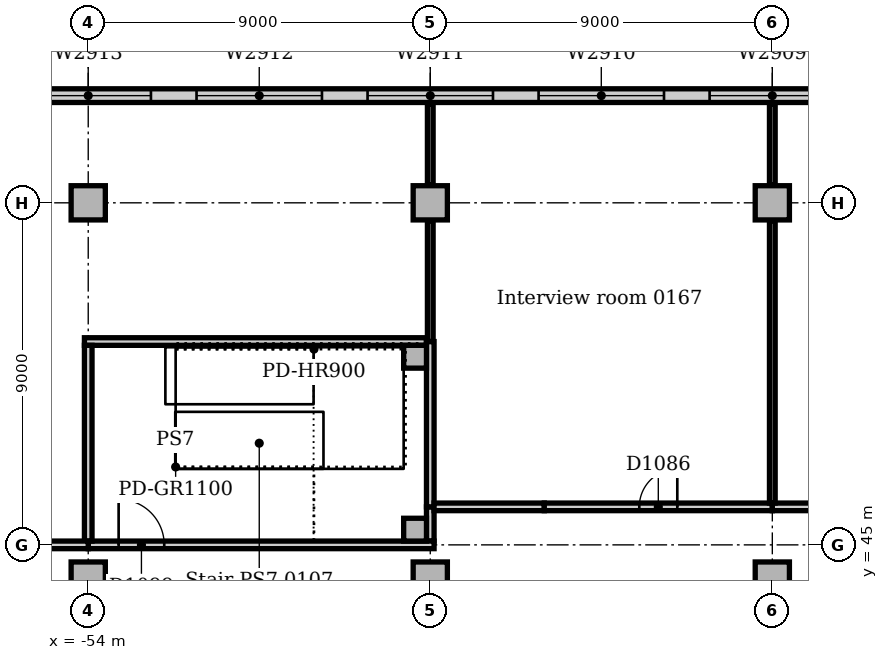
"""IFC4 building model, lengths in metres.
Left out: names, types, materials, properties, quantities, classifications, styles, units other than length and angle.
Written with IfcOpenShell. Run it as: python <this file> out.ifc"""

import sys

from ifc_helpers import new_model, si_unit, direction, frame, frame_2d, origin, origin_2d, place, context, subcontext, project, spatial, rectangle, extrude, element, fill, save


model = new_model("IFC4")
c1 = context("Model", 3, precision=1e-05, world=origin(), true_north=direction((0.0, 1.0)))
c2 = subcontext(c1, "Body", "Model", "MODEL_VIEW")
j1 = project(units=[si_unit("LENGTHUNIT", "METRE"), si_unit("PLANEANGLEUNIT", "RADIAN")], contexts=[c1])
p1 = place(None, origin())
s1 = spatial("IfcSite", under=j1, at=p1, CompositionType="ELEMENT")
p2 = place(p1, origin())
s2 = spatial("IfcBuilding", under=s1, at=p2, CompositionType="ELEMENT")
p3 = place(p2, frame((0.0, 0.0, 6.0)))
s3 = spatial("IfcBuildingStorey", under=s2, at=p3, CompositionType="ELEMENT", Elevation=6.0)
for number, where, z_axis, x_axis in (
    (1, (-54.0, 44.1, 0.0), (0.0, 0.0, 1.0), (1.0, 0.0, 0.0)),
    (2, (-45.0, 44.1, 0.0), (0.0, 0.0, 1.0), (1.0, 0.0, 0.0)),
    (3, (-36.0, 44.1, 0.0), (0.0, 0.0, 1.0), (1.0, 0.0, 0.0)),
    (4, (-54.0, 54.0, 0.0), (0.0, 0.0, 1.0), (1.0, 0.0, 0.0)),
    (5, (-45.0, 54.0, 0.0), (0.0, 0.0, 1.0), (1.0, 0.0, 0.0)),
    (6, (-36.0, 54.0, 0.0), (0.0, 0.0, 1.0), (1.0, 0.0, 0.0)),
):
    element("IfcColumn", number, at=place(p3, frame(where, z_axis=z_axis, x_axis=x_axis)), inside=s3, PredefinedType="COLUMN", context=c2, shape_type="SweptSolid", body=[
        extrude(rectangle(XDim=0.9, YDim=0.9, at=origin_2d()), origin(), (0.0, 0.0, 1.0), 4.7),
    ])
p4 = place(p3, frame((63.0, 56.82, 0.0), z_axis=(0.0, 0.0, 1.0), x_axis=(-1.0, 0.0, 0.0)))
e7 = element("IfcWall", 7, at=p4, inside=s3, PredefinedType="STANDARD", context=c2, shape_type="SweptSolid", body=[
    extrude(rectangle(XDim=144.0, YDim=0.36, at=frame_2d((72.0, 0.0))), origin(), (0.0, 0.0, 1.0), 4.7),
])
p5 = place(p4, frame((2.85, 0.0, 0.9)))
e8 = element("IfcOpeningElement", 8, at=p5, cuts=e7, PredefinedType="OPENING", context=c2, shape_type="SweptSolid", body=[
    extrude(rectangle(XDim=3.3, YDim=2.4, at=frame_2d((1.65, 1.2))), frame((0.0, 0.19, 0.0), z_axis=(0.0, -1.0, 0.0), x_axis=(1.0, 0.0, 0.0)), (0.0, 0.0, 1.0), 0.38),
])
p6 = place(p4, frame((7.35, 0.0, 0.9)))
e9 = element("IfcOpeningElement", 9, at=p6, cuts=e7, PredefinedType="OPENING", context=c2, shape_type="SweptSolid", body=[
    extrude(rectangle(XDim=3.3, YDim=2.4, at=frame_2d((1.65, 1.2))), frame((0.0, 0.19, 0.0), z_axis=(0.0, -1.0, 0.0), x_axis=(1.0, 0.0, 0.0)), (0.0, 0.0, 1.0), 0.38),
])
p7 = place(p4, frame((11.85, 0.0, 0.9)))
e10 = element("IfcOpeningElement", 10, at=p7, cuts=e7, PredefinedType="OPENING", context=c2, shape_type="SweptSolid", body=[
    extrude(rectangle(XDim=3.3, YDim=2.4, at=frame_2d((1.65, 1.2))), frame((0.0, 0.19, 0.0), z_axis=(0.0, -1.0, 0.0), x_axis=(1.0, 0.0, 0.0)), (0.0, 0.0, 1.0), 0.38),
])
p8 = place(p4, frame((16.35, 0.0, 0.9)))
e11 = element("IfcOpeningElement", 11, at=p8, cuts=e7, PredefinedType="OPENING", context=c2, shape_type="SweptSolid", body=[
    extrude(rectangle(XDim=3.3, YDim=2.4, at=frame_2d((1.65, 1.2))), frame((0.0, 0.19, 0.0), z_axis=(0.0, -1.0, 0.0), x_axis=(1.0, 0.0, 0.0)), (0.0, 0.0, 1.0), 0.38),
])
p9 = place(p4, frame((20.85, 0.0, 0.9)))
e12 = element("IfcOpeningElement", 12, at=p9, cuts=e7, PredefinedType="OPENING", context=c2, shape_type="SweptSolid", body=[
    extrude(rectangle(XDim=3.3, YDim=2.4, at=frame_2d((1.65, 1.2))), frame((0.0, 0.19, 0.0), z_axis=(0.0, -1.0, 0.0), x_axis=(1.0, 0.0, 0.0)), (0.0, 0.0, 1.0), 0.38),
])
p10 = place(p4, frame((25.35, 0.0, 0.9)))
e13 = element("IfcOpeningElement", 13, at=p10, cuts=e7, PredefinedType="OPENING", context=c2, shape_type="SweptSolid", body=[
    extrude(rectangle(XDim=3.3, YDim=2.4, at=frame_2d((1.65, 1.2))), frame((0.0, 0.19, 0.0), z_axis=(0.0, -1.0, 0.0), x_axis=(1.0, 0.0, 0.0)), (0.0, 0.0, 1.0), 0.38),
])
p11 = place(p4, frame((29.85, 0.0, 0.9)))
e14 = element("IfcOpeningElement", 14, at=p11, cuts=e7, PredefinedType="OPENING", context=c2, shape_type="SweptSolid", body=[
    extrude(rectangle(XDim=3.3, YDim=2.4, at=frame_2d((1.65, 1.2))), frame((0.0, 0.19, 0.0), z_axis=(0.0, -1.0, 0.0), x_axis=(1.0, 0.0, 0.0)), (0.0, 0.0, 1.0), 0.38),
])
p12 = place(p4, frame((34.35, 0.0, 0.9)))
e15 = element("IfcOpeningElement", 15, at=p12, cuts=e7, PredefinedType="OPENING", context=c2, shape_type="SweptSolid", body=[
    extrude(rectangle(XDim=3.3, YDim=2.4, at=frame_2d((1.65, 1.2))), frame((0.0, 0.19, 0.0), z_axis=(0.0, -1.0, 0.0), x_axis=(1.0, 0.0, 0.0)), (0.0, 0.0, 1.0), 0.38),
])
p13 = place(p4, frame((38.85, 0.0, 0.9)))
e16 = element("IfcOpeningElement", 16, at=p13, cuts=e7, PredefinedType="OPENING", context=c2, shape_type="SweptSolid", body=[
    extrude(rectangle(XDim=3.3, YDim=2.4, at=frame_2d((1.65, 1.2))), frame((0.0, 0.19, 0.0), z_axis=(0.0, -1.0, 0.0), x_axis=(1.0, 0.0, 0.0)), (0.0, 0.0, 1.0), 0.38),
])
p14 = place(p4, frame((43.35, 0.0, 0.9)))
e17 = element("IfcOpeningElement", 17, at=p14, cuts=e7, PredefinedType="OPENING", context=c2, shape_type="SweptSolid", body=[
    extrude(rectangle(XDim=3.3, YDim=2.4, at=frame_2d((1.65, 1.2))), frame((0.0, 0.19, 0.0), z_axis=(0.0, -1.0, 0.0), x_axis=(1.0, 0.0, 0.0)), (0.0, 0.0, 1.0), 0.38),
])
p15 = place(p4, frame((47.85, 0.0, 0.9)))
e18 = element("IfcOpeningElement", 18, at=p15, cuts=e7, PredefinedType="OPENING", context=c2, shape_type="SweptSolid", body=[
    extrude(rectangle(XDim=3.3, YDim=2.4, at=frame_2d((1.65, 1.2))), frame((0.0, 0.19, 0.0), z_axis=(0.0, -1.0, 0.0), x_axis=(1.0, 0.0, 0.0)), (0.0, 0.0, 1.0), 0.38),
])
p16 = place(p4, frame((52.35, 0.0, 0.9)))
e19 = element("IfcOpeningElement", 19, at=p16, cuts=e7, PredefinedType="OPENING", context=c2, shape_type="SweptSolid", body=[
    extrude(rectangle(XDim=3.3, YDim=2.4, at=frame_2d((1.65, 1.2))), frame((0.0, 0.19, 0.0), z_axis=(0.0, -1.0, 0.0), x_axis=(1.0, 0.0, 0.0)), (0.0, 0.0, 1.0), 0.38),
])
p17 = place(p4, frame((56.85, 0.0, 0.9)))
e20 = element("IfcOpeningElement", 20, at=p17, cuts=e7, PredefinedType="OPENING", context=c2, shape_type="SweptSolid", body=[
    extrude(rectangle(XDim=3.3, YDim=2.4, at=frame_2d((1.65, 1.2))), frame((0.0, 0.19, 0.0), z_axis=(0.0, -1.0, 0.0), x_axis=(1.0, 0.0, 0.0)), (0.0, 0.0, 1.0), 0.38),
])
p18 = place(p4, frame((61.35, 0.0, 0.9)))
e21 = element("IfcOpeningElement", 21, at=p18, cuts=e7, PredefinedType="OPENING", context=c2, shape_type="SweptSolid", body=[
    extrude(rectangle(XDim=3.3, YDim=2.4, at=frame_2d((1.65, 1.2))), frame((0.0, 0.19, 0.0), z_axis=(0.0, -1.0, 0.0), x_axis=(1.0, 0.0, 0.0)), (0.0, 0.0, 1.0), 0.38),
])
p19 = place(p4, frame((65.85, 0.0, 0.9)))
e22 = element("IfcOpeningElement", 22, at=p19, cuts=e7, PredefinedType="OPENING", context=c2, shape_type="SweptSolid", body=[
    extrude(rectangle(XDim=3.3, YDim=2.4, at=frame_2d((1.65, 1.2))), frame((0.0, 0.19, 0.0), z_axis=(0.0, -1.0, 0.0), x_axis=(1.0, 0.0, 0.0)), (0.0, 0.0, 1.0), 0.38),
])
p20 = place(p4, frame((70.35, 0.0, 0.9)))
e23 = element("IfcOpeningElement", 23, at=p20, cuts=e7, PredefinedType="OPENING", context=c2, shape_type="SweptSolid", body=[
    extrude(rectangle(XDim=3.3, YDim=2.4, at=frame_2d((1.65, 1.2))), frame((0.0, 0.19, 0.0), z_axis=(0.0, -1.0, 0.0), x_axis=(1.0, 0.0, 0.0)), (0.0, 0.0, 1.0), 0.38),
])
p21 = place(p4, frame((74.85, 0.0, 0.9)))
e24 = element("IfcOpeningElement", 24, at=p21, cuts=e7, PredefinedType="OPENING", context=c2, shape_type="SweptSolid", body=[
    extrude(rectangle(XDim=3.3, YDim=2.4, at=frame_2d((1.65, 1.2))), frame((0.0, 0.19, 0.0), z_axis=(0.0, -1.0, 0.0), x_axis=(1.0, 0.0, 0.0)), (0.0, 0.0, 1.0), 0.38),
])
p22 = place(p4, frame((79.35, 0.0, 0.9)))
e25 = element("IfcOpeningElement", 25, at=p22, cuts=e7, PredefinedType="OPENING", context=c2, shape_type="SweptSolid", body=[
    extrude(rectangle(XDim=3.3, YDim=2.4, at=frame_2d((1.65, 1.2))), frame((0.0, 0.19, 0.0), z_axis=(0.0, -1.0, 0.0), x_axis=(1.0, 0.0, 0.0)), (0.0, 0.0, 1.0), 0.38),
])
p23 = place(p4, frame((83.85, 0.0, 0.9)))
e26 = element("IfcOpeningElement", 26, at=p23, cuts=e7, PredefinedType="OPENING", context=c2, shape_type="SweptSolid", body=[
    extrude(rectangle(XDim=3.3, YDim=2.4, at=frame_2d((1.65, 1.2))), frame((0.0, 0.19, 0.0), z_axis=(0.0, -1.0, 0.0), x_axis=(1.0, 0.0, 0.0)), (0.0, 0.0, 1.0), 0.38),
])
p24 = place(p4, frame((88.35, 0.0, 0.9)))
e27 = element("IfcOpeningElement", 27, at=p24, cuts=e7, PredefinedType="OPENING", context=c2, shape_type="SweptSolid", body=[
    extrude(rectangle(XDim=3.3, YDim=2.4, at=frame_2d((1.65, 1.2))), frame((0.0, 0.19, 0.0), z_axis=(0.0, -1.0, 0.0), x_axis=(1.0, 0.0, 0.0)), (0.0, 0.0, 1.0), 0.38),
])
p25 = place(p4, frame((92.85, 0.0, 0.9)))
e28 = element("IfcOpeningElement", 28, at=p25, cuts=e7, PredefinedType="OPENING", context=c2, shape_type="SweptSolid", body=[
    extrude(rectangle(XDim=3.3, YDim=2.4, at=frame_2d((1.65, 1.2))), frame((0.0, 0.19, 0.0), z_axis=(0.0, -1.0, 0.0), x_axis=(1.0, 0.0, 0.0)), (0.0, 0.0, 1.0), 0.38),
])
p26 = place(p4, frame((97.35, 0.0, 0.9)))
e29 = element("IfcOpeningElement", 29, at=p26, cuts=e7, PredefinedType="OPENING", context=c2, shape_type="SweptSolid", body=[
    extrude(rectangle(XDim=3.3, YDim=2.4, at=frame_2d((1.65, 1.2))), frame((0.0, 0.19, 0.0), z_axis=(0.0, -1.0, 0.0), x_axis=(1.0, 0.0, 0.0)), (0.0, 0.0, 1.0), 0.38),
])
p27 = place(p4, frame((101.85, 0.0, 0.9)))
e30 = element("IfcOpeningElement", 30, at=p27, cuts=e7, PredefinedType="OPENING", context=c2, shape_type="SweptSolid", body=[
    extrude(rectangle(XDim=3.3, YDim=2.4, at=frame_2d((1.65, 1.2))), frame((0.0, 0.19, 0.0), z_axis=(0.0, -1.0, 0.0), x_axis=(1.0, 0.0, 0.0)), (0.0, 0.0, 1.0), 0.38),
])
p28 = place(p4, frame((106.35, 0.0, 0.9)))
e31 = element("IfcOpeningElement", 31, at=p28, cuts=e7, PredefinedType="OPENING", context=c2, shape_type="SweptSolid", body=[
    extrude(rectangle(XDim=3.3, YDim=2.4, at=frame_2d((1.65, 1.2))), frame((0.0, 0.19, 0.0), z_axis=(0.0, -1.0, 0.0), x_axis=(1.0, 0.0, 0.0)), (0.0, 0.0, 1.0), 0.38),
])
p29 = place(p4, frame((110.85, 0.0, 0.9)))
e32 = element("IfcOpeningElement", 32, at=p29, cuts=e7, PredefinedType="OPENING", context=c2, shape_type="SweptSolid", body=[
    extrude(rectangle(XDim=3.3, YDim=2.4, at=frame_2d((1.65, 1.2))), frame((0.0, 0.19, 0.0), z_axis=(0.0, -1.0, 0.0), x_axis=(1.0, 0.0, 0.0)), (0.0, 0.0, 1.0), 0.38),
])
p30 = place(p4, frame((115.35, 0.0, 0.9)))
e33 = element("IfcOpeningElement", 33, at=p30, cuts=e7, PredefinedType="OPENING", context=c2, shape_type="SweptSolid", body=[
    extrude(rectangle(XDim=3.3, YDim=2.4, at=frame_2d((1.65, 1.2))), frame((0.0, 0.19, 0.0), z_axis=(0.0, -1.0, 0.0), x_axis=(1.0, 0.0, 0.0)), (0.0, 0.0, 1.0), 0.38),
])
p31 = place(p4, frame((119.85, 0.0, 0.9)))
e34 = element("IfcOpeningElement", 34, at=p31, cuts=e7, PredefinedType="OPENING", context=c2, shape_type="SweptSolid", body=[
    extrude(rectangle(XDim=3.3, YDim=2.4, at=frame_2d((1.65, 1.2))), frame((0.0, 0.19, 0.0), z_axis=(0.0, -1.0, 0.0), x_axis=(1.0, 0.0, 0.0)), (0.0, 0.0, 1.0), 0.38),
])
p32 = place(p4, frame((124.35, 0.0, 0.9)))
e35 = element("IfcOpeningElement", 35, at=p32, cuts=e7, PredefinedType="OPENING", context=c2, shape_type="SweptSolid", body=[
    extrude(rectangle(XDim=3.3, YDim=2.4, at=frame_2d((1.65, 1.2))), frame((0.0, 0.19, 0.0), z_axis=(0.0, -1.0, 0.0), x_axis=(1.0, 0.0, 0.0)), (0.0, 0.0, 1.0), 0.38),
])
p33 = place(p4, frame((128.85, 0.0, 0.9)))
e36 = element("IfcOpeningElement", 36, at=p33, cuts=e7, PredefinedType="OPENING", context=c2, shape_type="SweptSolid", body=[
    extrude(rectangle(XDim=3.3, YDim=2.4, at=frame_2d((1.65, 1.2))), frame((0.0, 0.19, 0.0), z_axis=(0.0, -1.0, 0.0), x_axis=(1.0, 0.0, 0.0)), (0.0, 0.0, 1.0), 0.38),
])
p34 = place(p4, frame((133.35, 0.0, 0.9)))
e37 = element("IfcOpeningElement", 37, at=p34, cuts=e7, PredefinedType="OPENING", context=c2, shape_type="SweptSolid", body=[
    extrude(rectangle(XDim=3.3, YDim=2.4, at=frame_2d((1.65, 1.2))), frame((0.0, 0.19, 0.0), z_axis=(0.0, -1.0, 0.0), x_axis=(1.0, 0.0, 0.0)), (0.0, 0.0, 1.0), 0.38),
])
p35 = place(p4, frame((137.85, 0.0, 0.9)))
e38 = element("IfcOpeningElement", 38, at=p35, cuts=e7, PredefinedType="OPENING", context=c2, shape_type="SweptSolid", body=[
    extrude(rectangle(XDim=3.3, YDim=2.4, at=frame_2d((1.65, 1.2))), frame((0.0, 0.19, 0.0), z_axis=(0.0, -1.0, 0.0), x_axis=(1.0, 0.0, 0.0)), (0.0, 0.0, 1.0), 0.38),
])
for number, where, z_axis, x_axis in (
    (39, (-45.4, 49.95, 0.0), (0.0, 0.0, 1.0), (1.0, 0.0, 0.0)),
    (40, (-45.4, 45.4, 0.0), (0.0, 0.0, 1.0), (1.0, 0.0, 0.0)),
):
    element("IfcColumn", number, at=place(p3, frame(where, z_axis=z_axis, x_axis=x_axis)), inside=s3, PredefinedType="COLUMN", context=c2, shape_type="SweptSolid", body=[
        extrude(rectangle(XDim=0.6, YDim=0.6, at=origin_2d()), origin(), (0.0, 0.0, 1.0), 5.0),
    ])
p36 = place(p3, frame((-45.0, 45.1, 0.0), z_axis=(0.0, 0.0, 1.0), x_axis=(0.0, 1.0, 0.0)))
e41 = element("IfcWall", 41, at=p36, inside=s3, PredefinedType="SOLIDWALL", context=c2, shape_type="SweptSolid", body=[
    extrude(rectangle(XDim=0.9, YDim=0.2, at=frame_2d((0.45, 0.0))), origin(), (0.0, 0.0, 1.0), 4.7),
])
p37 = place(p3, frame((-54.0, 45.0, 0.0), z_axis=(0.0, 0.0, 1.0), x_axis=(1.0, 0.0, 0.0)))
e42 = element("IfcWall", 42, at=p37, inside=s3, PredefinedType="SOLIDWALL", context=c2, shape_type="SweptSolid", body=[
    extrude(rectangle(XDim=9.1, YDim=0.2, at=frame_2d((4.55, 0.0))), origin(), (0.0, 0.0, 1.0), 4.7),
])
p38 = place(p37, frame((0.8, 0.0, 0.0)))
e43 = element("IfcOpeningElement", 43, at=p38, cuts=e42, PredefinedType="OPENING", context=c2, shape_type="SweptSolid", body=[
    extrude(rectangle(XDim=1.2, YDim=2.1, at=frame_2d((0.6, 1.05))), frame((0.0, 0.11, 0.0), z_axis=(0.0, -1.0, 0.0), x_axis=(1.0, 0.0, 0.0)), (0.0, 0.0, 1.0), 0.22),
])
p39 = place(p3, frame((-54.1, 50.35, 0.0), z_axis=(0.0, 0.0, 1.0), x_axis=(1.0, 0.0, 0.0)))
e44 = element("IfcWall", 44, at=p39, inside=s3, PredefinedType="SOLIDWALL", context=c2, shape_type="SweptSolid", body=[
    extrude(rectangle(XDim=9.0, YDim=0.2, at=frame_2d((4.5, 0.0))), origin(), (0.0, 0.0, 1.0), 4.7),
])
p40 = place(p3, frame((-54.0, 45.1, 0.0), z_axis=(0.0, 0.0, 1.0), x_axis=(0.0, 1.0, 0.0)))
e45 = element("IfcWall", 45, at=p40, inside=s3, PredefinedType="SOLIDWALL", context=c2, shape_type="SweptSolid", body=[
    extrude(rectangle(XDim=5.15, YDim=0.2, at=frame_2d((2.575, 0.0))), origin(), (0.0, 0.0, 1.0), 4.7),
])
p41 = place(p3, frame((-45.0, 46.0, 0.0), z_axis=(0.0, 0.0, 1.0), x_axis=(0.0, 1.0, 0.0)))
e46 = element("IfcWall", 46, at=p41, inside=s3, PredefinedType="SOLIDWALL", context=c2, shape_type="SweptSolid", body=[
    extrude(rectangle(XDim=4.35, YDim=0.2, at=frame_2d((2.175, 0.0))), origin(), (0.0, 0.0, 1.0), 4.7),
])
p42 = place(p3, frame((-63.0, 45.0, 0.0), z_axis=(0.0, 0.0, 1.0), x_axis=(1.0, 0.0, 0.0)))
e47 = element("IfcWall", 47, at=p42, inside=s3, PredefinedType="PARTITIONING", context=c2, shape_type="SweptSolid", body=[
    extrude(rectangle(XDim=9.0, YDim=0.2, at=frame_2d((4.5, 0.0))), origin(), (0.0, 0.0, 1.0), 4.7),
])
p43 = place(p42, frame((3.6, 0.0, 0.0)))
e48 = element("IfcOpeningElement", 48, at=p43, cuts=e47, PredefinedType="OPENING", context=c2, shape_type="SweptSolid", body=[
    extrude(rectangle(XDim=1.8, YDim=2.1, at=frame_2d((0.9, 1.05))), frame((0.0, 0.11, 0.0), z_axis=(0.0, -1.0, 0.0), x_axis=(1.0, 0.0, 0.0)), (0.0, 0.0, 1.0), 0.22),
])
p44 = place(p3, frame((-44.9, 46.0, 0.0), z_axis=(0.0, 0.0, 1.0), x_axis=(1.0, 0.0, 0.0)))
e49 = element("IfcWall", 49, at=p44, inside=s3, PredefinedType="PARTITIONING", context=c2, shape_type="SweptSolid", body=[
    extrude(rectangle(XDim=2.9, YDim=0.2, at=frame_2d((1.45, 0.0))), origin(), (0.0, 0.0, 1.0), 4.7),
])
p45 = place(p3, frame((-42.0, 46.0, 0.0), z_axis=(0.0, 0.0, 1.0), x_axis=(1.0, 0.0, 0.0)))
e50 = element("IfcWall", 50, at=p45, inside=s3, PredefinedType="PARTITIONING", context=c2, shape_type="SweptSolid", body=[
    extrude(rectangle(XDim=6.0, YDim=0.2, at=frame_2d((3.0, 0.0))), origin(), (0.0, 0.0, 1.0), 4.7),
])
p46 = place(p45, frame((2.5, 0.0, 0.0)))
e51 = element("IfcOpeningElement", 51, at=p46, cuts=e50, PredefinedType="OPENING", context=c2, shape_type="SweptSolid", body=[
    extrude(rectangle(XDim=1.0, YDim=2.1, at=frame_2d((0.5, 1.05))), frame((0.0, 0.11, 0.0), z_axis=(0.0, -1.0, 0.0), x_axis=(1.0, 0.0, 0.0)), (0.0, 0.0, 1.0), 0.22),
])
p47 = place(p3, frame((-36.0, 46.0, 0.0), z_axis=(0.0, 0.0, 1.0), x_axis=(1.0, 0.0, 0.0)))
e52 = element("IfcWall", 52, at=p47, inside=s3, PredefinedType="PARTITIONING", context=c2, shape_type="SweptSolid", body=[
    extrude(rectangle(XDim=8.9, YDim=0.2, at=frame_2d((4.45, 0.0))), origin(), (0.0, 0.0, 1.0), 4.7),
])
p48 = place(p47, frame((4.0, 0.0, 0.0)))
e53 = element("IfcOpeningElement", 53, at=p48, cuts=e52, PredefinedType="OPENING", context=c2, shape_type="SweptSolid", body=[
    extrude(rectangle(XDim=1.0, YDim=2.1, at=frame_2d((0.5, 1.05))), frame((0.0, 0.11, 0.0), z_axis=(0.0, -1.0, 0.0), x_axis=(1.0, 0.0, 0.0)), (0.0, 0.0, 1.0), 0.22),
])
p49 = place(p3, frame((-45.0, 50.35, 0.0), z_axis=(0.0, 0.0, 1.0), x_axis=(0.0, 1.0, 0.0)))
e54 = element("IfcWall", 54, at=p49, inside=s3, PredefinedType="PARTITIONING", context=c2, shape_type="SweptSolid", body=[
    extrude(rectangle(XDim=3.18, YDim=0.15, at=frame_2d((1.59, 0.0))), origin(), (0.0, 0.0, 1.0), 4.7),
])
p50 = place(p3, frame((-45.0, 54.47, 0.0), z_axis=(0.0, 0.0, 1.0), x_axis=(0.0, 1.0, 0.0)))
e55 = element("IfcWall", 55, at=p50, inside=s3, PredefinedType="PARTITIONING", context=c2, shape_type="SweptSolid", body=[
    extrude(rectangle(XDim=2.13, YDim=0.15, at=frame_2d((1.065, 0.0))), origin(), (0.0, 0.0, 1.0), 4.7),
])
p51 = place(p3, frame((-36.0, 46.1, 0.0), z_axis=(0.0, 0.0, 1.0), x_axis=(0.0, 1.0, 0.0)))
e56 = element("IfcWall", 56, at=p51, inside=s3, PredefinedType="PARTITIONING", context=c2, shape_type="SweptSolid", body=[
    extrude(rectangle(XDim=7.43, YDim=0.15, at=frame_2d((3.715, 0.0))), origin(), (0.0, 0.0, 1.0), 4.7),
])
p52 = place(p3, frame((-36.0, 54.47, 0.0), z_axis=(0.0, 0.0, 1.0), x_axis=(0.0, 1.0, 0.0)))
e57 = element("IfcWall", 57, at=p52, inside=s3, PredefinedType="PARTITIONING", context=c2, shape_type="SweptSolid", body=[
    extrude(rectangle(XDim=2.13, YDim=0.15, at=frame_2d((1.065, 0.0))), origin(), (0.0, 0.0, 1.0), 4.7),
])
p53 = place(p26, origin())
e58 = element("IfcWindow", 58, at=p53, inside=s3, PartitioningType="SINGLE_PANEL", PredefinedType="WINDOW", context=c2, shape_type="SweptSolid", body=[
    extrude(rectangle(XDim=3.3, YDim=2.4, at=frame_2d((1.65, 1.2))), frame((0.0, 0.13, 0.0), z_axis=(0.0, -1.0, 0.0), x_axis=(1.0, 0.0, 0.0)), (0.0, 0.0, 1.0), 0.06),
])
fill(e29, e58)
p54 = place(p27, origin())
e59 = element("IfcWindow", 59, at=p54, inside=s3, PartitioningType="SINGLE_PANEL", PredefinedType="WINDOW", context=c2, shape_type="SweptSolid", body=[
    extrude(rectangle(XDim=3.3, YDim=2.4, at=frame_2d((1.65, 1.2))), frame((0.0, 0.13, 0.0), z_axis=(0.0, -1.0, 0.0), x_axis=(1.0, 0.0, 0.0)), (0.0, 0.0, 1.0), 0.06),
])
fill(e30, e59)
p55 = place(p28, origin())
e60 = element("IfcWindow", 60, at=p55, inside=s3, PartitioningType="SINGLE_PANEL", PredefinedType="WINDOW", context=c2, shape_type="SweptSolid", body=[
    extrude(rectangle(XDim=3.3, YDim=2.4, at=frame_2d((1.65, 1.2))), frame((0.0, 0.13, 0.0), z_axis=(0.0, -1.0, 0.0), x_axis=(1.0, 0.0, 0.0)), (0.0, 0.0, 1.0), 0.06),
])
fill(e31, e60)
p56 = place(p29, origin())
e61 = element("IfcWindow", 61, at=p56, inside=s3, PartitioningType="SINGLE_PANEL", PredefinedType="WINDOW", context=c2, shape_type="SweptSolid", body=[
    extrude(rectangle(XDim=3.3, YDim=2.4, at=frame_2d((1.65, 1.2))), frame((0.0, 0.13, 0.0), z_axis=(0.0, -1.0, 0.0), x_axis=(1.0, 0.0, 0.0)), (0.0, 0.0, 1.0), 0.06),
])
fill(e32, e61)
p57 = place(p30, origin())
e62 = element("IfcWindow", 62, at=p57, inside=s3, PartitioningType="SINGLE_PANEL", PredefinedType="WINDOW", context=c2, shape_type="SweptSolid", body=[
    extrude(rectangle(XDim=3.3, YDim=2.4, at=frame_2d((1.65, 1.2))), frame((0.0, 0.13, 0.0), z_axis=(0.0, -1.0, 0.0), x_axis=(1.0, 0.0, 0.0)), (0.0, 0.0, 1.0), 0.06),
])
fill(e33, e62)
p58 = place(p46, origin())
e63 = element("IfcDoor", 63, at=p58, inside=s3, OperationType="SINGLE_SWING_RIGHT", PredefinedType="DOOR", context=c2, shape_type="SweptSolid", body=[
    extrude(rectangle(XDim=1.0, YDim=2.1, at=frame_2d((0.5, 1.05))), frame((0.0, 0.025, 0.0), z_axis=(0.0, -1.0, 0.0), x_axis=(1.0, 0.0, 0.0)), (0.0, 0.0, 1.0), 0.05),
])
fill(e51, e63)
p59 = place(p38, origin())
e64 = element("IfcDoor", 64, at=p59, inside=s3, OperationType="SINGLE_SWING_LEFT", PredefinedType="DOOR", context=c2, shape_type="SweptSolid", body=[
    extrude(rectangle(XDim=1.2, YDim=2.1, at=frame_2d((0.6, 1.05))), frame((0.0, 0.025, 0.0), z_axis=(0.0, -1.0, 0.0), x_axis=(1.0, 0.0, 0.0)), (0.0, 0.0, 1.0), 0.05),
])
fill(e43, e64)
save(model, sys.argv[1])
